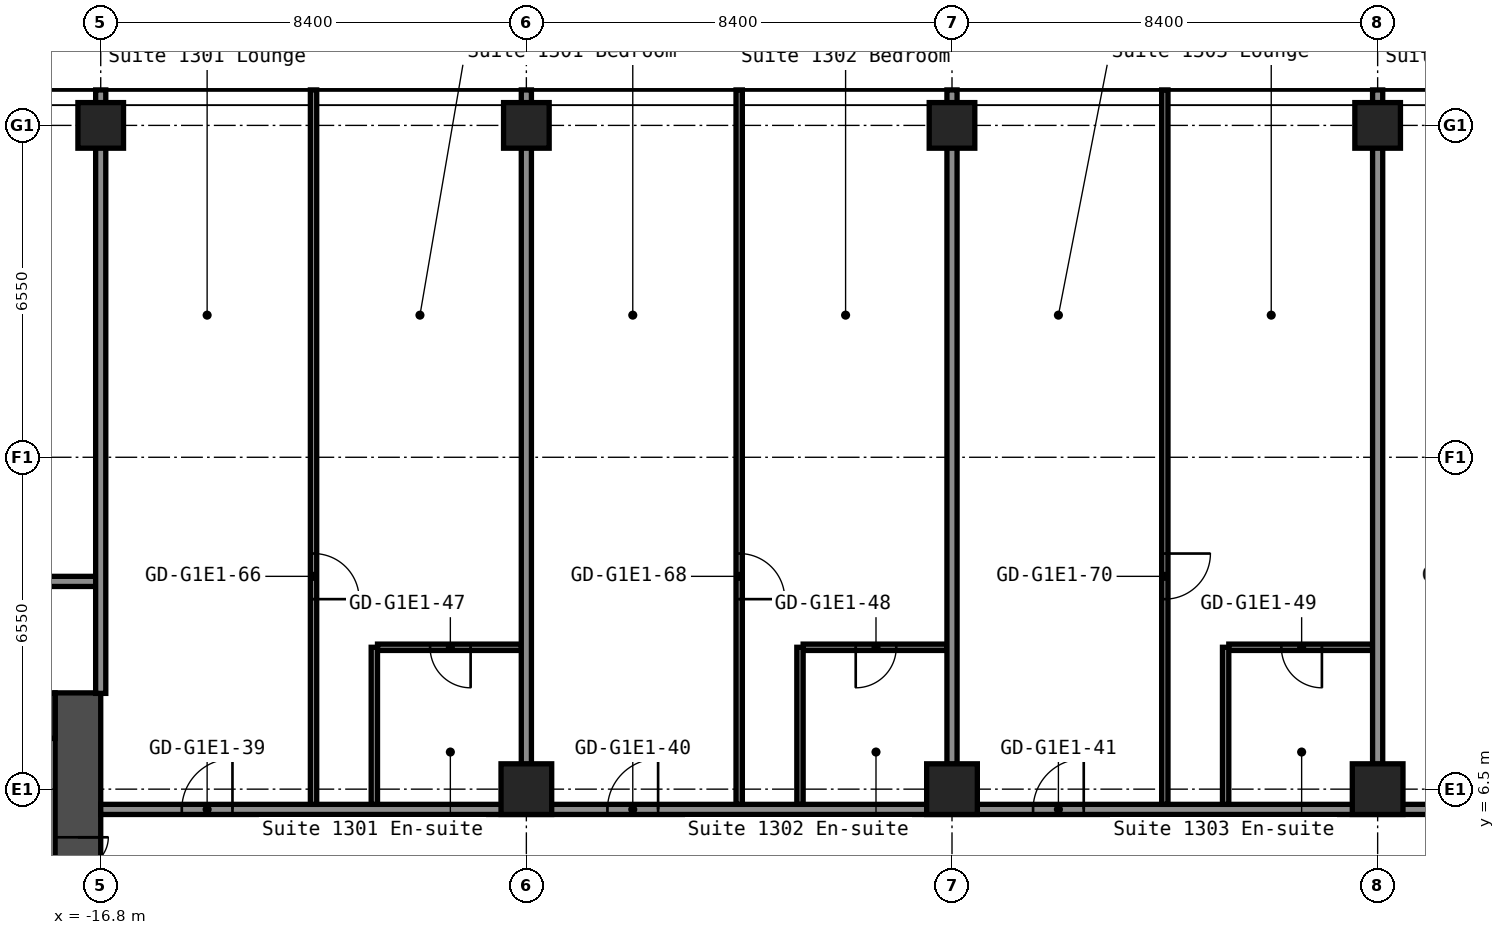
"""IFC4 building model, lengths in metres.
Left out: names, types, materials, properties, quantities, classifications, styles, units other than length and angle.
Written with IfcOpenShell. Run it as: python <this file> out.ifc"""

import sys

from ifc_helpers import new_model, si_unit, direction, frame, frame_2d, origin, origin_2d, place, context, subcontext, project, spatial, rectangle, hollow_rectangle, extrude, element, fill, save


model = new_model("IFC4")
c1 = context("Model", 3, precision=1e-05, world=origin(), true_north=direction((0.0, 1.0)))
c2 = subcontext(c1, "Body", "Model", "MODEL_VIEW")
j1 = project(units=[si_unit("LENGTHUNIT", "METRE"), si_unit("PLANEANGLEUNIT", "RADIAN")], contexts=[c1])
p1 = place(None, origin())
s1 = spatial("IfcSite", under=j1, at=p1, CompositionType="ELEMENT")
p2 = place(p1, origin())
s2 = spatial("IfcBuilding", under=s1, at=p2, CompositionType="ELEMENT")
p3 = place(p2, frame((0.0, 0.0, 48.6)))
s3 = spatial("IfcBuildingStorey", under=s2, at=p3, CompositionType="ELEMENT", Elevation=48.6)
p4 = place(p3, frame((-16.8, 19.6, 0.0), z_axis=(0.0, 0.0, 1.0), x_axis=(1.0, 0.0, 0.0)))
e1 = element("IfcColumn", 1, at=p4, inside=s3, PredefinedType="COLUMN", context=c2, shape_type="SweptSolid", body=[
    extrude(hollow_rectangle(XDim=0.9, YDim=0.9, WallThickness=0.036, at=origin_2d()), origin(), (0.0, 0.0, 1.0), 2.8),
])
p5 = place(p3, frame((-8.4, 6.5, 0.0), z_axis=(0.0, 0.0, 1.0), x_axis=(1.0, 0.0, 0.0)))
e2 = element("IfcColumn", 2, at=p5, inside=s3, PredefinedType="COLUMN", context=c2, shape_type="SweptSolid", body=[
    extrude(hollow_rectangle(XDim=1.0, YDim=1.0, WallThickness=0.04, at=origin_2d()), origin(), (0.0, 0.0, 1.0), 2.8),
])
p6 = place(p3, frame((-8.4, 19.6, 0.0), z_axis=(0.0, 0.0, 1.0), x_axis=(1.0, 0.0, 0.0)))
e3 = element("IfcColumn", 3, at=p6, inside=s3, PredefinedType="COLUMN", context=c2, shape_type="SweptSolid", body=[
    extrude(hollow_rectangle(XDim=0.9, YDim=0.9, WallThickness=0.036, at=origin_2d()), origin(), (0.0, 0.0, 1.0), 2.8),
])
p7 = place(p3, frame((0.0, 6.5, 0.0), z_axis=(0.0, 0.0, 1.0), x_axis=(1.0, 0.0, 0.0)))
e4 = element("IfcColumn", 4, at=p7, inside=s3, PredefinedType="COLUMN", context=c2, shape_type="SweptSolid", body=[
    extrude(hollow_rectangle(XDim=1.0, YDim=1.0, WallThickness=0.04, at=origin_2d()), origin(), (0.0, 0.0, 1.0), 2.8),
])
p8 = place(p3, frame((0.0, 19.6, 0.0), z_axis=(0.0, 0.0, 1.0), x_axis=(1.0, 0.0, 0.0)))
e5 = element("IfcColumn", 5, at=p8, inside=s3, PredefinedType="COLUMN", context=c2, shape_type="SweptSolid", body=[
    extrude(hollow_rectangle(XDim=0.9, YDim=0.9, WallThickness=0.036, at=origin_2d()), origin(), (0.0, 0.0, 1.0), 2.8),
])
p9 = place(p3, frame((8.4, 6.5, 0.0), z_axis=(0.0, 0.0, 1.0), x_axis=(1.0, 0.0, 0.0)))
e6 = element("IfcColumn", 6, at=p9, inside=s3, PredefinedType="COLUMN", context=c2, shape_type="SweptSolid", body=[
    extrude(hollow_rectangle(XDim=1.0, YDim=1.0, WallThickness=0.04, at=origin_2d()), origin(), (0.0, 0.0, 1.0), 2.8),
])
p10 = place(p3, frame((8.4, 19.6, 0.0), z_axis=(0.0, 0.0, 1.0), x_axis=(1.0, 0.0, 0.0)))
e7 = element("IfcColumn", 7, at=p10, inside=s3, PredefinedType="COLUMN", context=c2, shape_type="SweptSolid", body=[
    extrude(hollow_rectangle(XDim=0.9, YDim=0.9, WallThickness=0.036, at=origin_2d()), origin(), (0.0, 0.0, 1.0), 2.8),
])
p11 = place(p3, frame((-17.25, -8.4, 0.0), z_axis=(0.0, 0.0, 1.0), x_axis=(0.0, 1.0, 0.0)))
e8 = element("IfcWall", 8, at=p11, inside=s3, PredefinedType="SHEAR", context=c2, shape_type="SweptSolid", body=[
    extrude(rectangle(XDim=16.8, YDim=0.9, at=frame_2d((8.4, 0.0))), origin(), (0.0, 0.0, 1.0), 2.8),
])
p12 = place(p11, frame((12.75, 0.0, 0.0)))
e9 = element("IfcOpeningElement", 9, at=p12, cuts=e8, PredefinedType="OPENING", context=c2, shape_type="SweptSolid", body=[
    extrude(rectangle(XDim=1.2, YDim=2.1, at=frame_2d((0.6, 1.05))), frame((0.0, 0.46, 0.0), z_axis=(0.0, -1.0, 0.0), x_axis=(1.0, 0.0, 0.0)), (0.0, 0.0, 1.0), 0.92),
])
p13 = place(p11, frame((2.85, 0.0, 0.0)))
e10 = element("IfcOpeningElement", 10, at=p13, cuts=e8, PredefinedType="OPENING", context=c2, shape_type="SweptSolid", body=[
    extrude(rectangle(XDim=1.2, YDim=2.1, at=frame_2d((0.6, 1.05))), frame((0.0, 0.46, 0.0), z_axis=(0.0, -1.0, 0.0), x_axis=(1.0, 0.0, 0.0)), (0.0, 0.0, 1.0), 0.92),
])
p14 = place(p3, frame((-32.7, 7.95, 0.0), z_axis=(0.0, 0.0, 1.0), x_axis=(1.0, 0.0, 0.0)))
e11 = element("IfcWall", 11, at=p14, inside=s3, PredefinedType="SHEAR", context=c2, shape_type="SweptSolid", body=[
    extrude(rectangle(XDim=15.0, YDim=0.9, at=frame_2d((7.5, 0.0))), origin(), (0.0, 0.0, 1.0), 2.8),
])
p15 = place(p14, frame((3.4, 0.0, 0.0)))
e12 = element("IfcOpeningElement", 12, at=p15, cuts=e11, PredefinedType="OPENING", context=c2, shape_type="SweptSolid", body=[
    extrude(rectangle(XDim=1.2, YDim=2.1, at=frame_2d((0.6, 1.05))), frame((0.0, 0.46, 0.0), z_axis=(0.0, -1.0, 0.0), x_axis=(1.0, 0.0, 0.0)), (0.0, 0.0, 1.0), 0.92),
])
p16 = place(p14, frame((0.75, 0.0, 0.0)))
e13 = element("IfcOpeningElement", 13, at=p16, cuts=e11, PredefinedType="OPENING", context=c2, shape_type="SweptSolid", body=[
    extrude(rectangle(XDim=0.9, YDim=2.1, at=frame_2d((0.45, 1.05))), frame((0.0, 0.46, 0.0), z_axis=(0.0, -1.0, 0.0), x_axis=(1.0, 0.0, 0.0)), (0.0, 0.0, 1.0), 0.92),
])
p17 = place(p3, frame((-16.8, 6.1, 0.0), z_axis=(0.0, 0.0, 1.0), x_axis=(1.0, 0.0, 0.0)))
e14 = element("IfcWall", 14, at=p17, inside=s3, PredefinedType="PARTITIONING", context=c2, shape_type="SweptSolid", body=[
    extrude(rectangle(XDim=33.6, YDim=0.2, at=frame_2d((16.8, 0.0))), origin(), (0.0, 0.0, 1.0), 2.8),
])
p18 = place(p17, frame((1.6, 0.0, 0.0)))
e15 = element("IfcOpeningElement", 15, at=p18, cuts=e14, PredefinedType="OPENING", context=c2, shape_type="SweptSolid", body=[
    extrude(rectangle(XDim=1.0, YDim=2.1, at=frame_2d((0.5, 1.05))), frame((0.0, 0.11, 0.0), z_axis=(0.0, -1.0, 0.0), x_axis=(1.0, 0.0, 0.0)), (0.0, 0.0, 1.0), 0.22),
])
p19 = place(p17, frame((10.0, 0.0, 0.0)))
e16 = element("IfcOpeningElement", 16, at=p19, cuts=e14, PredefinedType="OPENING", context=c2, shape_type="SweptSolid", body=[
    extrude(rectangle(XDim=1.0, YDim=2.1, at=frame_2d((0.5, 1.05))), frame((0.0, 0.11, 0.0), z_axis=(0.0, -1.0, 0.0), x_axis=(1.0, 0.0, 0.0)), (0.0, 0.0, 1.0), 0.22),
])
p20 = place(p17, frame((18.4, 0.0, 0.0)))
e17 = element("IfcOpeningElement", 17, at=p20, cuts=e14, PredefinedType="OPENING", context=c2, shape_type="SweptSolid", body=[
    extrude(rectangle(XDim=1.0, YDim=2.1, at=frame_2d((0.5, 1.05))), frame((0.0, 0.11, 0.0), z_axis=(0.0, -1.0, 0.0), x_axis=(1.0, 0.0, 0.0)), (0.0, 0.0, 1.0), 0.22),
])
p21 = place(p17, frame((26.8, 0.0, 0.0)))
e18 = element("IfcOpeningElement", 18, at=p21, cuts=e14, PredefinedType="OPENING", context=c2, shape_type="SweptSolid", body=[
    extrude(rectangle(XDim=1.0, YDim=2.1, at=frame_2d((0.5, 1.05))), frame((0.0, 0.11, 0.0), z_axis=(0.0, -1.0, 0.0), x_axis=(1.0, 0.0, 0.0)), (0.0, 0.0, 1.0), 0.22),
])
p22 = place(p3, frame((-11.337, 9.3, 0.0), z_axis=(0.0, 0.0, 1.0), x_axis=(1.0, 0.0, 0.0)))
e19 = element("IfcWall", 19, at=p22, inside=s3, PredefinedType="PARTITIONING", context=c2, shape_type="SweptSolid", body=[
    extrude(rectangle(XDim=2.837, YDim=0.125, at=frame_2d((1.419, 0.0))), origin(), (0.0, 0.0, 1.0), 2.8),
])
p23 = place(p22, frame((1.038, 0.0, 0.0)))
e20 = element("IfcOpeningElement", 20, at=p23, cuts=e19, PredefinedType="OPENING", context=c2, shape_type="SweptSolid", body=[
    extrude(rectangle(XDim=0.8, YDim=2.1, at=frame_2d((0.4, 1.05))), frame((0.0, 0.073, 0.0), z_axis=(0.0, -1.0, 0.0), x_axis=(1.0, 0.0, 0.0)), (0.0, 0.0, 1.0), 0.145),
])
p24 = place(p3, frame((-2.938, 9.3, 0.0), z_axis=(0.0, 0.0, 1.0), x_axis=(1.0, 0.0, 0.0)))
e21 = element("IfcWall", 21, at=p24, inside=s3, PredefinedType="PARTITIONING", context=c2, shape_type="SweptSolid", body=[
    extrude(rectangle(XDim=2.837, YDim=0.125, at=frame_2d((1.419, 0.0))), origin(), (0.0, 0.0, 1.0), 2.8),
])
p25 = place(p24, frame((1.038, 0.0, 0.0)))
e22 = element("IfcOpeningElement", 22, at=p25, cuts=e21, PredefinedType="OPENING", context=c2, shape_type="SweptSolid", body=[
    extrude(rectangle(XDim=0.8, YDim=2.1, at=frame_2d((0.4, 1.05))), frame((0.0, 0.073, 0.0), z_axis=(0.0, -1.0, 0.0), x_axis=(1.0, 0.0, 0.0)), (0.0, 0.0, 1.0), 0.145),
])
p26 = place(p3, frame((5.462, 9.3, 0.0), z_axis=(0.0, 0.0, 1.0), x_axis=(1.0, 0.0, 0.0)))
e23 = element("IfcWall", 23, at=p26, inside=s3, PredefinedType="PARTITIONING", context=c2, shape_type="SweptSolid", body=[
    extrude(rectangle(XDim=2.838, YDim=0.125, at=frame_2d((1.419, 0.0))), origin(), (0.0, 0.0, 1.0), 2.8),
])
p27 = place(p26, frame((1.038, 0.0, 0.0)))
e24 = element("IfcOpeningElement", 24, at=p27, cuts=e23, PredefinedType="OPENING", context=c2, shape_type="SweptSolid", body=[
    extrude(rectangle(XDim=0.8, YDim=2.1, at=frame_2d((0.4, 1.05))), frame((0.0, 0.073, 0.0), z_axis=(0.0, -1.0, 0.0), x_axis=(1.0, 0.0, 0.0)), (0.0, 0.0, 1.0), 0.145),
])
p28 = place(p3, frame((-51.1, 10.6, 0.0), z_axis=(0.0, 0.0, 1.0), x_axis=(1.0, 0.0, 0.0)))
e25 = element("IfcWall", 25, at=p28, inside=s3, PredefinedType="PARTITIONING", context=c2, shape_type="SweptSolid", body=[
    extrude(rectangle(XDim=34.3, YDim=0.2, at=frame_2d((17.15, 0.0))), origin(), (0.0, 0.0, 1.0), 2.8),
])
p29 = place(p28, frame((4.2, 0.0, 0.0)))
e26 = element("IfcOpeningElement", 26, at=p29, cuts=e25, PredefinedType="OPENING", context=c2, shape_type="SweptSolid", body=[
    extrude(rectangle(XDim=1.0, YDim=2.1, at=frame_2d((0.5, 1.05))), frame((0.0, 0.11, 0.0), z_axis=(0.0, -1.0, 0.0), x_axis=(1.0, 0.0, 0.0)), (0.0, 0.0, 1.0), 0.22),
])
p30 = place(p28, frame((11.085, 0.0, 0.0)))
e27 = element("IfcOpeningElement", 27, at=p30, cuts=e25, PredefinedType="OPENING", context=c2, shape_type="SweptSolid", body=[
    extrude(rectangle(XDim=0.9, YDim=2.1, at=frame_2d((0.45, 1.05))), frame((0.0, 0.11, 0.0), z_axis=(0.0, -1.0, 0.0), x_axis=(1.0, 0.0, 0.0)), (0.0, 0.0, 1.0), 0.22),
])
p31 = place(p28, frame((15.285, 0.0, 0.0)))
e28 = element("IfcOpeningElement", 28, at=p31, cuts=e25, PredefinedType="OPENING", context=c2, shape_type="SweptSolid", body=[
    extrude(rectangle(XDim=0.9, YDim=2.1, at=frame_2d((0.45, 1.05))), frame((0.0, 0.11, 0.0), z_axis=(0.0, -1.0, 0.0), x_axis=(1.0, 0.0, 0.0)), (0.0, 0.0, 1.0), 0.22),
])
p32 = place(p28, frame((18.98, 0.0, 0.0)))
e29 = element("IfcOpeningElement", 29, at=p32, cuts=e25, PredefinedType="OPENING", context=c2, shape_type="SweptSolid", body=[
    extrude(rectangle(XDim=0.9, YDim=2.1, at=frame_2d((0.45, 1.05))), frame((0.0, 0.11, 0.0), z_axis=(0.0, -1.0, 0.0), x_axis=(1.0, 0.0, 0.0)), (0.0, 0.0, 1.0), 0.22),
])
p33 = place(p28, frame((23.18, 0.0, 0.0)))
e30 = element("IfcOpeningElement", 30, at=p33, cuts=e25, PredefinedType="OPENING", context=c2, shape_type="SweptSolid", body=[
    extrude(rectangle(XDim=0.9, YDim=2.1, at=frame_2d((0.45, 1.05))), frame((0.0, 0.11, 0.0), z_axis=(0.0, -1.0, 0.0), x_axis=(1.0, 0.0, 0.0)), (0.0, 0.0, 1.0), 0.22),
])
p34 = place(p28, frame((29.6, 0.0, 0.0)))
e31 = element("IfcOpeningElement", 31, at=p34, cuts=e25, PredefinedType="OPENING", context=c2, shape_type="SweptSolid", body=[
    extrude(rectangle(XDim=1.0, YDim=2.1, at=frame_2d((0.5, 1.05))), frame((0.0, 0.11, 0.0), z_axis=(0.0, -1.0, 0.0), x_axis=(1.0, 0.0, 0.0)), (0.0, 0.0, 1.0), 0.22),
])
p35 = place(p3, frame((-16.8, 8.39, 0.0), z_axis=(0.0, 0.0, 1.0), x_axis=(0.0, 1.0, 0.0)))
e32 = element("IfcWall", 32, at=p35, inside=s3, PredefinedType="PARTITIONING", context=c2, shape_type="SweptSolid", body=[
    extrude(rectangle(XDim=11.91, YDim=0.2, at=frame_2d((5.955, 0.0))), origin(), (0.0, 0.0, 1.0), 2.8),
])
p36 = place(p3, frame((-12.6, 6.2, 0.0), z_axis=(0.0, 0.0, 1.0), x_axis=(0.0, 1.0, 0.0)))
e33 = element("IfcWall", 33, at=p36, inside=s3, PredefinedType="PARTITIONING", context=c2, shape_type="SweptSolid", body=[
    extrude(rectangle(XDim=14.1, YDim=0.125, at=frame_2d((7.05, 0.0))), origin(), (0.0, 0.0, 1.0), 2.8),
])
p37 = place(p36, frame((4.05, 0.0, 0.0)))
e34 = element("IfcOpeningElement", 34, at=p37, cuts=e33, PredefinedType="OPENING", context=c2, shape_type="SweptSolid", body=[
    extrude(rectangle(XDim=0.9, YDim=2.1, at=frame_2d((0.45, 1.05))), frame((0.0, 0.073, 0.0), z_axis=(0.0, -1.0, 0.0), x_axis=(1.0, 0.0, 0.0)), (0.0, 0.0, 1.0), 0.145),
])
p38 = place(p3, frame((-11.4, 6.2, 0.0), z_axis=(0.0, 0.0, 1.0), x_axis=(0.0, 1.0, 0.0)))
e35 = element("IfcWall", 35, at=p38, inside=s3, PredefinedType="PARTITIONING", context=c2, shape_type="SweptSolid", body=[
    extrude(rectangle(XDim=3.1, YDim=0.125, at=frame_2d((1.55, 0.0))), origin(), (0.0, 0.0, 1.0), 2.8),
])
p39 = place(p3, frame((-8.4, 6.99, 0.0), z_axis=(0.0, 0.0, 1.0), x_axis=(0.0, 1.0, 0.0)))
e36 = element("IfcWall", 36, at=p39, inside=s3, PredefinedType="PARTITIONING", context=c2, shape_type="SweptSolid", body=[
    extrude(rectangle(XDim=13.31, YDim=0.2, at=frame_2d((6.655, 0.0))), origin(), (0.0, 0.0, 1.0), 2.8),
])
p40 = place(p3, frame((-4.2, 6.2, 0.0), z_axis=(0.0, 0.0, 1.0), x_axis=(0.0, 1.0, 0.0)))
e37 = element("IfcWall", 37, at=p40, inside=s3, PredefinedType="PARTITIONING", context=c2, shape_type="SweptSolid", body=[
    extrude(rectangle(XDim=14.1, YDim=0.125, at=frame_2d((7.05, 0.0))), origin(), (0.0, 0.0, 1.0), 2.8),
])
p41 = place(p40, frame((4.05, 0.0, 0.0)))
e38 = element("IfcOpeningElement", 38, at=p41, cuts=e37, PredefinedType="OPENING", context=c2, shape_type="SweptSolid", body=[
    extrude(rectangle(XDim=0.9, YDim=2.1, at=frame_2d((0.45, 1.05))), frame((0.0, 0.073, 0.0), z_axis=(0.0, -1.0, 0.0), x_axis=(1.0, 0.0, 0.0)), (0.0, 0.0, 1.0), 0.145),
])
p42 = place(p3, frame((-3.0, 6.2, 0.0), z_axis=(0.0, 0.0, 1.0), x_axis=(0.0, 1.0, 0.0)))
e39 = element("IfcWall", 39, at=p42, inside=s3, PredefinedType="PARTITIONING", context=c2, shape_type="SweptSolid", body=[
    extrude(rectangle(XDim=3.1, YDim=0.125, at=frame_2d((1.55, 0.0))), origin(), (0.0, 0.0, 1.0), 2.8),
])
p43 = place(p3, frame((0.0, 6.99, 0.0), z_axis=(0.0, 0.0, 1.0), x_axis=(0.0, 1.0, 0.0)))
e40 = element("IfcWall", 40, at=p43, inside=s3, PredefinedType="PARTITIONING", context=c2, shape_type="SweptSolid", body=[
    extrude(rectangle(XDim=13.31, YDim=0.2, at=frame_2d((6.655, 0.0))), origin(), (0.0, 0.0, 1.0), 2.8),
])
p44 = place(p3, frame((4.2, 6.2, 0.0), z_axis=(0.0, 0.0, 1.0), x_axis=(0.0, 1.0, 0.0)))
e41 = element("IfcWall", 41, at=p44, inside=s3, PredefinedType="PARTITIONING", context=c2, shape_type="SweptSolid", body=[
    extrude(rectangle(XDim=14.1, YDim=0.125, at=frame_2d((7.05, 0.0))), origin(), (0.0, 0.0, 1.0), 2.8),
])
p45 = place(p44, frame((4.05, 0.0, 0.0)))
e42 = element("IfcOpeningElement", 42, at=p45, cuts=e41, PredefinedType="OPENING", context=c2, shape_type="SweptSolid", body=[
    extrude(rectangle(XDim=0.9, YDim=2.1, at=frame_2d((0.45, 1.05))), frame((0.0, 0.073, 0.0), z_axis=(0.0, -1.0, 0.0), x_axis=(1.0, 0.0, 0.0)), (0.0, 0.0, 1.0), 0.145),
])
p46 = place(p3, frame((5.4, 6.2, 0.0), z_axis=(0.0, 0.0, 1.0), x_axis=(0.0, 1.0, 0.0)))
e43 = element("IfcWall", 43, at=p46, inside=s3, PredefinedType="PARTITIONING", context=c2, shape_type="SweptSolid", body=[
    extrude(rectangle(XDim=3.1, YDim=0.125, at=frame_2d((1.55, 0.0))), origin(), (0.0, 0.0, 1.0), 2.8),
])
p47 = place(p3, frame((8.4, 6.99, 0.0), z_axis=(0.0, 0.0, 1.0), x_axis=(0.0, 1.0, 0.0)))
e44 = element("IfcWall", 44, at=p47, inside=s3, PredefinedType="PARTITIONING", context=c2, shape_type="SweptSolid", body=[
    extrude(rectangle(XDim=13.31, YDim=0.2, at=frame_2d((6.655, 0.0))), origin(), (0.0, 0.0, 1.0), 2.8),
])
p48 = place(p12, origin())
e45 = element("IfcDoor", 45, at=p48, inside=s3, OperationType="DOUBLE_DOOR_SINGLE_SWING", PredefinedType="DOOR", context=c2, shape_type="SweptSolid", body=[
    extrude(rectangle(XDim=1.2, YDim=2.1, at=frame_2d((0.6, 1.05))), frame((0.0, 0.025, 0.0), z_axis=(0.0, -1.0, 0.0), x_axis=(1.0, 0.0, 0.0)), (0.0, 0.0, 1.0), 0.05),
])
fill(e9, e45)
p49 = place(p18, origin())
e46 = element("IfcDoor", 46, at=p49, inside=s3, OperationType="SINGLE_SWING_LEFT", PredefinedType="DOOR", context=c2, shape_type="SweptSolid", body=[
    extrude(rectangle(XDim=1.0, YDim=2.1, at=frame_2d((0.5, 1.05))), frame((0.0, 0.025, 0.0), z_axis=(0.0, -1.0, 0.0), x_axis=(1.0, 0.0, 0.0)), (0.0, 0.0, 1.0), 0.05),
])
fill(e15, e46)
p50 = place(p19, origin())
e47 = element("IfcDoor", 47, at=p50, inside=s3, OperationType="SINGLE_SWING_LEFT", PredefinedType="DOOR", context=c2, shape_type="SweptSolid", body=[
    extrude(rectangle(XDim=1.0, YDim=2.1, at=frame_2d((0.5, 1.05))), frame((0.0, 0.025, 0.0), z_axis=(0.0, -1.0, 0.0), x_axis=(1.0, 0.0, 0.0)), (0.0, 0.0, 1.0), 0.05),
])
fill(e16, e47)
p51 = place(p20, origin())
e48 = element("IfcDoor", 48, at=p51, inside=s3, OperationType="SINGLE_SWING_LEFT", PredefinedType="DOOR", context=c2, shape_type="SweptSolid", body=[
    extrude(rectangle(XDim=1.0, YDim=2.1, at=frame_2d((0.5, 1.05))), frame((0.0, 0.025, 0.0), z_axis=(0.0, -1.0, 0.0), x_axis=(1.0, 0.0, 0.0)), (0.0, 0.0, 1.0), 0.05),
])
fill(e17, e48)
p52 = place(p23, origin())
e49 = element("IfcDoor", 49, at=p52, inside=s3, OperationType="SINGLE_SWING_RIGHT", PredefinedType="DOOR", context=c2, shape_type="SweptSolid", body=[
    extrude(rectangle(XDim=0.8, YDim=2.1, at=frame_2d((0.4, 1.05))), frame((0.0, 0.025, 0.0), z_axis=(0.0, -1.0, 0.0), x_axis=(1.0, 0.0, 0.0)), (0.0, 0.0, 1.0), 0.05),
])
fill(e20, e49)
p53 = place(p25, origin())
e50 = element("IfcDoor", 50, at=p53, inside=s3, OperationType="SINGLE_SWING_LEFT", PredefinedType="DOOR", context=c2, shape_type="SweptSolid", body=[
    extrude(rectangle(XDim=0.8, YDim=2.1, at=frame_2d((0.4, 1.05))), frame((0.0, 0.025, 0.0), z_axis=(0.0, -1.0, 0.0), x_axis=(1.0, 0.0, 0.0)), (0.0, 0.0, 1.0), 0.05),
])
fill(e22, e50)
p54 = place(p27, origin())
e51 = element("IfcDoor", 51, at=p54, inside=s3, OperationType="SINGLE_SWING_RIGHT", PredefinedType="DOOR", context=c2, shape_type="SweptSolid", body=[
    extrude(rectangle(XDim=0.8, YDim=2.1, at=frame_2d((0.4, 1.05))), frame((0.0, 0.025, 0.0), z_axis=(0.0, -1.0, 0.0), x_axis=(1.0, 0.0, 0.0)), (0.0, 0.0, 1.0), 0.05),
])
fill(e24, e51)
p55 = place(p37, origin())
e52 = element("IfcDoor", 52, at=p55, inside=s3, OperationType="SINGLE_SWING_LEFT", PredefinedType="DOOR", context=c2, shape_type="SweptSolid", body=[
    extrude(rectangle(XDim=0.9, YDim=2.1, at=frame_2d((0.45, 1.05))), frame((0.0, 0.025, 0.0), z_axis=(0.0, -1.0, 0.0), x_axis=(1.0, 0.0, 0.0)), (0.0, 0.0, 1.0), 0.05),
])
fill(e34, e52)
p56 = place(p41, origin())
e53 = element("IfcDoor", 53, at=p56, inside=s3, OperationType="SINGLE_SWING_LEFT", PredefinedType="DOOR", context=c2, shape_type="SweptSolid", body=[
    extrude(rectangle(XDim=0.9, YDim=2.1, at=frame_2d((0.45, 1.05))), frame((0.0, 0.025, 0.0), z_axis=(0.0, -1.0, 0.0), x_axis=(1.0, 0.0, 0.0)), (0.0, 0.0, 1.0), 0.05),
])
fill(e38, e53)
p57 = place(p45, origin())
e54 = element("IfcDoor", 54, at=p57, inside=s3, OperationType="SINGLE_SWING_RIGHT", PredefinedType="DOOR", context=c2, shape_type="SweptSolid", body=[
    extrude(rectangle(XDim=0.9, YDim=2.1, at=frame_2d((0.45, 1.05))), frame((0.0, 0.025, 0.0), z_axis=(0.0, -1.0, 0.0), x_axis=(1.0, 0.0, 0.0)), (0.0, 0.0, 1.0), 0.05),
])
fill(e42, e54)
save(model, sys.argv[1])
